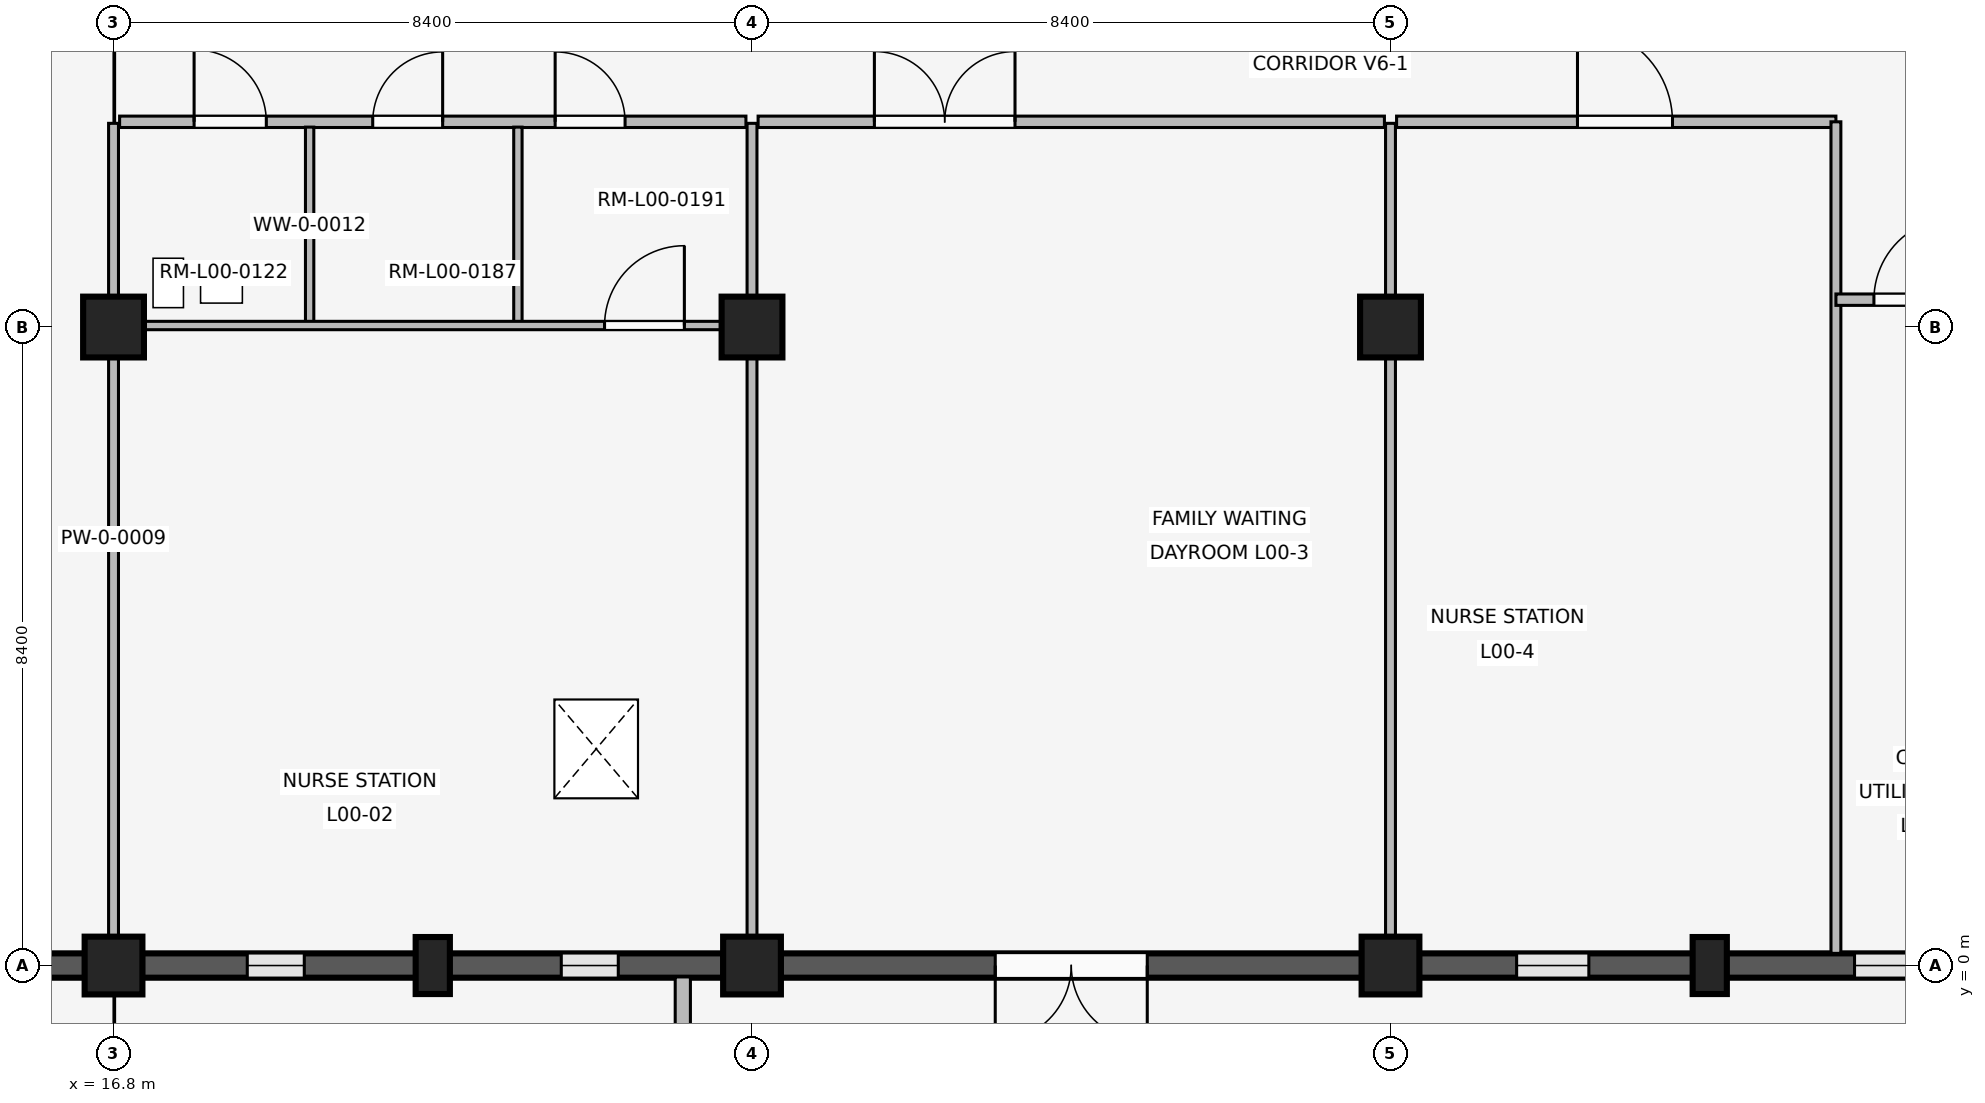
"""IFC4 building model, lengths in metres.
Left out: names, types, materials, properties, quantities, classifications, styles, units other than length and angle.
Written with IfcOpenShell. Run it as: python <this file> out.ifc"""

import sys

from ifc_helpers import new_model, si_unit, direction, frame, frame_2d, origin, origin_2d, place, context, subcontext, project, spatial, rectangle, extrude, element, fill, save


model = new_model("IFC4")
c1 = context("Model", 3, precision=1e-05, world=origin(), true_north=direction((0.0, 1.0)))
c2 = subcontext(c1, "Body", "Model", "MODEL_VIEW")
j1 = project(units=[si_unit("LENGTHUNIT", "METRE"), si_unit("PLANEANGLEUNIT", "RADIAN")], contexts=[c1])
p1 = place(None, origin())
s1 = spatial("IfcSite", under=j1, at=p1, CompositionType="ELEMENT")
p2 = place(p1, origin())
s2 = spatial("IfcBuilding", under=s1, at=p2, CompositionType="ELEMENT")
p3 = place(p2, origin())
s3 = spatial("IfcBuildingStorey", under=s2, at=p3, CompositionType="ELEMENT", Elevation=0.0)
p4 = place(p3, frame((16.8, 0.0, 0.0), z_axis=(0.0, 0.0, 1.0), x_axis=(1.0, 0.0, 0.0)))
e1 = element("IfcColumn", 1, at=p4, inside=s3, PredefinedType="COLUMN", context=c2, shape_type="SweptSolid", body=[
    extrude(rectangle(XDim=0.76, YDim=0.76, at=origin_2d()), origin(), (0.0, 0.0, 1.0), 4.8),
])
p5 = place(p3, frame((16.8, 8.4, 0.0), z_axis=(0.0, 0.0, 1.0), x_axis=(1.0, 0.0, 0.0)))
e2 = element("IfcColumn", 2, at=p5, inside=s3, PredefinedType="COLUMN", context=c2, shape_type="SweptSolid", body=[
    extrude(rectangle(XDim=0.8, YDim=0.8, at=origin_2d()), origin(), (0.0, 0.0, 1.0), 4.8),
])
p6 = place(p3, frame((25.2, 0.0, 0.0), z_axis=(0.0, 0.0, 1.0), x_axis=(1.0, 0.0, 0.0)))
e3 = element("IfcColumn", 3, at=p6, inside=s3, PredefinedType="COLUMN", context=c2, shape_type="SweptSolid", body=[
    extrude(rectangle(XDim=0.76, YDim=0.76, at=origin_2d()), origin(), (0.0, 0.0, 1.0), 4.8),
])
p7 = place(p3, frame((25.2, 8.4, 0.0), z_axis=(0.0, 0.0, 1.0), x_axis=(1.0, 0.0, 0.0)))
e4 = element("IfcColumn", 4, at=p7, inside=s3, PredefinedType="COLUMN", context=c2, shape_type="SweptSolid", body=[
    extrude(rectangle(XDim=0.8, YDim=0.8, at=origin_2d()), origin(), (0.0, 0.0, 1.0), 4.8),
])
p8 = place(p3, frame((33.6, 0.0, 0.0), z_axis=(0.0, 0.0, 1.0), x_axis=(1.0, 0.0, 0.0)))
e5 = element("IfcColumn", 5, at=p8, inside=s3, PredefinedType="COLUMN", context=c2, shape_type="SweptSolid", body=[
    extrude(rectangle(XDim=0.76, YDim=0.76, at=origin_2d()), origin(), (0.0, 0.0, 1.0), 4.8),
])
p9 = place(p3, frame((33.6, 8.4, 0.0), z_axis=(0.0, 0.0, 1.0), x_axis=(1.0, 0.0, 0.0)))
e6 = element("IfcColumn", 6, at=p9, inside=s3, PredefinedType="COLUMN", context=c2, shape_type="SweptSolid", body=[
    extrude(rectangle(XDim=0.8, YDim=0.8, at=origin_2d()), origin(), (0.0, 0.0, 1.0), 4.8),
])
for number, where, z_axis, x_axis in (
    (7, (21.0, 0.0, 0.0), (0.0, 0.0, 1.0), (1.0, 0.0, 0.0)),
    (8, (37.8, 0.0, 0.0), (0.0, 0.0, 1.0), (1.0, 0.0, 0.0)),
):
    element("IfcColumn", number, at=place(p3, frame(where, z_axis=z_axis, x_axis=x_axis)), inside=s3, PredefinedType="PILASTER", context=c2, shape_type="SweptSolid", body=[
        extrude(rectangle(XDim=0.45, YDim=0.75, at=origin_2d()), origin(), (0.0, 0.0, 1.0), 4.8),
    ])
p10 = place(p3, frame((16.425, 0.0, 0.0), z_axis=(0.0, 0.0, 1.0), x_axis=(-1.0, 0.0, 0.0)))
e9 = element("IfcWall", 9, at=p10, inside=s3, PredefinedType="SOLIDWALL", context=c2, shape_type="SweptSolid", body=[
    extrude(rectangle(XDim=7.65, YDim=0.32, at=frame_2d((3.825, 0.0))), origin(), (0.0, 0.0, 1.0), 3.82),
])
p11 = place(p10, frame((2.625, 0.0, 0.0)))
e10 = element("IfcOpeningElement", 10, at=p11, cuts=e9, PredefinedType="OPENING", context=c2, shape_type="SweptSolid", body=[
    extrude(rectangle(XDim=2.4, YDim=2.65, at=frame_2d((1.2, 1.325))), frame((0.0, 0.17, 0.0), z_axis=(0.0, -1.0, 0.0), x_axis=(1.0, 0.0, 0.0)), (0.0, 0.0, 1.0), 0.34),
])
p12 = place(p3, frame((24.825, 0.0, 0.0), z_axis=(0.0, 0.0, 1.0), x_axis=(-1.0, 0.0, 0.0)))
e11 = element("IfcWall", 11, at=p12, inside=s3, PredefinedType="SOLIDWALL", context=c2, shape_type="SweptSolid", body=[
    extrude(rectangle(XDim=7.65, YDim=0.32, at=frame_2d((3.825, 0.0))), origin(), (0.0, 0.0, 1.0), 3.82),
])
p13 = place(p12, frame((1.385, 0.0, 0.85)))
e12 = element("IfcOpeningElement", 12, at=p13, cuts=e11, PredefinedType="OPENING", context=c2, shape_type="SweptSolid", body=[
    extrude(rectangle(XDim=0.75, YDim=1.85, at=frame_2d((0.375, 0.925))), frame((0.0, 0.17, 0.0), z_axis=(0.0, -1.0, 0.0), x_axis=(1.0, 0.0, 0.0)), (0.0, 0.0, 1.0), 0.34),
])
p14 = place(p12, frame((5.515, 0.0, 0.85)))
e13 = element("IfcOpeningElement", 13, at=p14, cuts=e11, PredefinedType="OPENING", context=c2, shape_type="SweptSolid", body=[
    extrude(rectangle(XDim=0.75, YDim=1.85, at=frame_2d((0.375, 0.925))), frame((0.0, 0.17, 0.0), z_axis=(0.0, -1.0, 0.0), x_axis=(1.0, 0.0, 0.0)), (0.0, 0.0, 1.0), 0.34),
])
p15 = place(p3, frame((24.29, -0.15, 0.0), z_axis=(0.0, 0.0, 1.0), x_axis=(0.0, -1.0, 0.0)))
e14 = element("IfcWall", 14, at=p15, inside=s3, PredefinedType="ELEMENTEDWALL", context=c2, shape_type="SweptSolid", body=[
    extrude(rectangle(XDim=0.85, YDim=0.2, at=frame_2d((0.425, 0.0))), origin(), (0.0, 0.0, 1.0), 3.8),
])
p16 = place(p3, frame((33.225, 0.0, 0.0), z_axis=(0.0, 0.0, 1.0), x_axis=(-1.0, 0.0, 0.0)))
e15 = element("IfcWall", 15, at=p16, inside=s3, PredefinedType="SOLIDWALL", context=c2, shape_type="SweptSolid", body=[
    extrude(rectangle(XDim=7.65, YDim=0.32, at=frame_2d((3.825, 0.0))), origin(), (0.0, 0.0, 1.0), 3.82),
])
p17 = place(p16, frame((2.825, 0.0, 0.0)))
e16 = element("IfcOpeningElement", 16, at=p17, cuts=e15, PredefinedType="OPENING", context=c2, shape_type="SweptSolid", body=[
    extrude(rectangle(XDim=2.0, YDim=2.4, at=frame_2d((1.0, 1.2))), frame((0.0, 0.17, 0.0), z_axis=(0.0, -1.0, 0.0), x_axis=(1.0, 0.0, 0.0)), (0.0, 0.0, 1.0), 0.34),
])
p18 = place(p3, frame((41.625, 0.0, 0.0), z_axis=(0.0, 0.0, 1.0), x_axis=(-1.0, 0.0, 0.0)))
e17 = element("IfcWall", 17, at=p18, inside=s3, PredefinedType="SOLIDWALL", context=c2, shape_type="SweptSolid", body=[
    extrude(rectangle(XDim=7.65, YDim=0.32, at=frame_2d((3.825, 0.0))), origin(), (0.0, 0.0, 1.0), 3.82),
])
p19 = place(p18, frame((0.97, 0.0, 0.85)))
e18 = element("IfcOpeningElement", 18, at=p19, cuts=e17, PredefinedType="OPENING", context=c2, shape_type="SweptSolid", body=[
    extrude(rectangle(XDim=0.95, YDim=1.6, at=frame_2d((0.475, 0.8))), frame((0.0, 0.17, 0.0), z_axis=(0.0, -1.0, 0.0), x_axis=(1.0, 0.0, 0.0)), (0.0, 0.0, 1.0), 0.34),
])
p20 = place(p18, frame((5.416, 0.0, 0.85)))
e19 = element("IfcOpeningElement", 19, at=p20, cuts=e17, PredefinedType="OPENING", context=c2, shape_type="SweptSolid", body=[
    extrude(rectangle(XDim=0.95, YDim=1.6, at=frame_2d((0.475, 0.8))), frame((0.0, 0.17, 0.0), z_axis=(0.0, -1.0, 0.0), x_axis=(1.0, 0.0, 0.0)), (0.0, 0.0, 1.0), 0.34),
])
p21 = place(p3, frame((16.8, 0.14, 0.0), z_axis=(0.0, 0.0, 1.0), x_axis=(0.0, 1.0, 0.0)))
e20 = element("IfcWall", 20, at=p21, inside=s3, PredefinedType="PARTITIONING", context=c2, shape_type="SweptSolid", body=[
    extrude(rectangle(XDim=10.94, YDim=0.13, at=frame_2d((5.47, 0.0))), origin(), (0.0, 0.0, 1.0), 3.8),
])
p22 = place(p3, frame((16.88, 11.1, 0.0), z_axis=(0.0, 0.0, 1.0), x_axis=(1.0, 0.0, 0.0)))
e21 = element("IfcWall", 21, at=p22, inside=s3, PredefinedType="PARTITIONING", context=c2, shape_type="SweptSolid", body=[
    extrude(rectangle(XDim=8.24, YDim=0.15, at=frame_2d((4.12, 0.0))), origin(), (0.0, 0.0, 1.0), 3.8),
])
p23 = place(p22, frame((0.98, 0.0, 0.0)))
e22 = element("IfcOpeningElement", 22, at=p23, cuts=e21, PredefinedType="OPENING", context=c2, shape_type="SweptSolid", body=[
    extrude(rectangle(XDim=0.95, YDim=2.15, at=frame_2d((0.475, 1.075))), frame((0.0, 0.085, 0.0), z_axis=(0.0, -1.0, 0.0), x_axis=(1.0, 0.0, 0.0)), (0.0, 0.0, 1.0), 0.17),
])
p24 = place(p22, frame((3.33, 0.0, 0.0)))
e23 = element("IfcOpeningElement", 23, at=p24, cuts=e21, PredefinedType="OPENING", context=c2, shape_type="SweptSolid", body=[
    extrude(rectangle(XDim=0.92, YDim=2.1, at=frame_2d((0.46, 1.05))), frame((0.0, 0.085, 0.0), z_axis=(0.0, -1.0, 0.0), x_axis=(1.0, 0.0, 0.0)), (0.0, 0.0, 1.0), 0.17),
])
p25 = place(p22, frame((5.73, 0.0, 0.0)))
e24 = element("IfcOpeningElement", 24, at=p25, cuts=e21, PredefinedType="OPENING", context=c2, shape_type="SweptSolid", body=[
    extrude(rectangle(XDim=0.92, YDim=2.1, at=frame_2d((0.46, 1.05))), frame((0.0, 0.085, 0.0), z_axis=(0.0, -1.0, 0.0), x_axis=(1.0, 0.0, 0.0)), (0.0, 0.0, 1.0), 0.17),
])
for number, where, z_axis, x_axis in (
    (25, (19.38, 8.44, 0.0), (0.0, 0.0, 1.0), (0.0, 1.0, 0.0)),
    (26, (22.12, 8.44, 0.0), (0.0, 0.0, 1.0), (0.0, 1.0, 0.0)),
):
    element("IfcWall", number, at=place(p3, frame(where, z_axis=z_axis, x_axis=x_axis)), inside=s3, PredefinedType="PARTITIONING", context=c2, shape_type="SweptSolid", body=[
        extrude(rectangle(XDim=2.59, YDim=0.11, at=frame_2d((1.295, 0.0))), origin(), (0.0, 0.0, 1.0), 3.8),
    ])
p26 = place(p3, frame((16.88, 8.42, 0.0), z_axis=(0.0, 0.0, 1.0), x_axis=(1.0, 0.0, 0.0)))
e27 = element("IfcWall", 27, at=p26, inside=s3, PredefinedType="PARTITIONING", context=c2, shape_type="SweptSolid", body=[
    extrude(rectangle(XDim=8.24, YDim=0.11, at=frame_2d((4.12, 0.0))), origin(), (0.0, 0.0, 1.0), 3.8),
])
p27 = place(p26, frame((6.38, 0.0, 0.0)))
e28 = element("IfcOpeningElement", 28, at=p27, cuts=e27, PredefinedType="OPENING", context=c2, shape_type="SweptSolid", body=[
    extrude(rectangle(XDim=1.05, YDim=2.2, at=frame_2d((0.525, 1.1))), frame((0.0, 0.065, 0.0), z_axis=(0.0, -1.0, 0.0), x_axis=(1.0, 0.0, 0.0)), (0.0, 0.0, 1.0), 0.13),
])
p28 = place(p3, frame((25.2, 0.14, 0.0), z_axis=(0.0, 0.0, 1.0), x_axis=(0.0, 1.0, 0.0)))
e29 = element("IfcWall", 29, at=p28, inside=s3, PredefinedType="PARTITIONING", context=c2, shape_type="SweptSolid", body=[
    extrude(rectangle(XDim=10.94, YDim=0.13, at=frame_2d((5.47, 0.0))), origin(), (0.0, 0.0, 1.0), 3.8),
])
p29 = place(p3, frame((25.28, 11.1, 0.0), z_axis=(0.0, 0.0, 1.0), x_axis=(1.0, 0.0, 0.0)))
e30 = element("IfcWall", 30, at=p29, inside=s3, PredefinedType="PARTITIONING", context=c2, shape_type="SweptSolid", body=[
    extrude(rectangle(XDim=8.24, YDim=0.15, at=frame_2d((4.12, 0.0))), origin(), (0.0, 0.0, 1.0), 3.8),
])
p30 = place(p29, frame((1.53, 0.0, 0.0)))
e31 = element("IfcOpeningElement", 31, at=p30, cuts=e30, PredefinedType="OPENING", context=c2, shape_type="SweptSolid", body=[
    extrude(rectangle(XDim=1.85, YDim=2.3, at=frame_2d((0.925, 1.15))), frame((0.0, 0.085, 0.0), z_axis=(0.0, -1.0, 0.0), x_axis=(1.0, 0.0, 0.0)), (0.0, 0.0, 1.0), 0.17),
])
p31 = place(p3, frame((33.6, 0.14, 0.0), z_axis=(0.0, 0.0, 1.0), x_axis=(0.0, 1.0, 0.0)))
e32 = element("IfcWall", 32, at=p31, inside=s3, PredefinedType="PARTITIONING", context=c2, shape_type="SweptSolid", body=[
    extrude(rectangle(XDim=10.94, YDim=0.13, at=frame_2d((5.47, 0.0))), origin(), (0.0, 0.0, 1.0), 3.8),
])
p32 = place(p3, frame((33.68, 11.1, 0.0), z_axis=(0.0, 0.0, 1.0), x_axis=(1.0, 0.0, 0.0)))
e33 = element("IfcWall", 33, at=p32, inside=s3, PredefinedType="PARTITIONING", context=c2, shape_type="SweptSolid", body=[
    extrude(rectangle(XDim=5.78, YDim=0.15, at=frame_2d((2.89, 0.0))), origin(), (0.0, 0.0, 1.0), 3.8),
])
p33 = place(p32, frame((2.38, 0.0, 0.0)))
e34 = element("IfcOpeningElement", 34, at=p33, cuts=e33, PredefinedType="OPENING", context=c2, shape_type="SweptSolid", body=[
    extrude(rectangle(XDim=1.25, YDim=2.2, at=frame_2d((0.625, 1.1))), frame((0.0, 0.085, 0.0), z_axis=(0.0, -1.0, 0.0), x_axis=(1.0, 0.0, 0.0)), (0.0, 0.0, 1.0), 0.17),
])
p34 = place(p3, frame((39.46, 0.16, 0.0), z_axis=(0.0, 0.0, 1.0), x_axis=(0.0, 1.0, 0.0)))
e35 = element("IfcWall", 35, at=p34, inside=s3, PredefinedType="PARTITIONING", context=c2, shape_type="SweptSolid", body=[
    extrude(rectangle(XDim=10.94, YDim=0.13, at=frame_2d((5.47, 0.0))), origin(), (0.0, 0.0, 1.0), 3.8),
])
p35 = place(p3, frame((39.46, 8.76, 0.0), z_axis=(0.0, 0.0, 1.0), x_axis=(1.0, 0.0, 0.0)))
e36 = element("IfcWall", 36, at=p35, inside=s3, PredefinedType="PARTITIONING", context=c2, shape_type="SweptSolid", body=[
    extrude(rectangle(XDim=2.18, YDim=0.15, at=frame_2d((1.09, 0.0))), origin(), (0.0, 0.0, 1.0), 3.8),
])
p36 = place(p35, frame((0.5, 0.0, 0.0)))
e37 = element("IfcOpeningElement", 37, at=p36, cuts=e36, PredefinedType="OPENING", context=c2, shape_type="SweptSolid", body=[
    extrude(rectangle(XDim=1.08, YDim=2.15, at=frame_2d((0.54, 1.075))), frame((0.0, 0.085, 0.0), z_axis=(0.0, -1.0, 0.0), x_axis=(1.0, 0.0, 0.0)), (0.0, 0.0, 1.0), 0.17),
])
p37 = place(p13, origin())
e38 = element("IfcWindow", 38, at=p37, inside=s3, PartitioningType="SINGLE_PANEL", PredefinedType="WINDOW", context=c2, shape_type="SweptSolid", body=[
    extrude(rectangle(XDim=0.75, YDim=1.85, at=frame_2d((0.375, 0.925))), frame((0.0, 0.03, 0.0), z_axis=(0.0, -1.0, 0.0), x_axis=(1.0, 0.0, 0.0)), (0.0, 0.0, 1.0), 0.06),
])
fill(e12, e38)
p38 = place(p14, origin())
e39 = element("IfcWindow", 39, at=p38, inside=s3, PartitioningType="SINGLE_PANEL", PredefinedType="WINDOW", context=c2, shape_type="SweptSolid", body=[
    extrude(rectangle(XDim=0.75, YDim=1.85, at=frame_2d((0.375, 0.925))), frame((0.0, 0.03, 0.0), z_axis=(0.0, -1.0, 0.0), x_axis=(1.0, 0.0, 0.0)), (0.0, 0.0, 1.0), 0.06),
])
fill(e13, e39)
p39 = place(p17, origin())
e40 = element("IfcDoor", 40, at=p39, inside=s3, OperationType="DOUBLE_SWING_LEFT", PredefinedType="DOOR", context=c2, shape_type="SweptSolid", body=[
    extrude(rectangle(XDim=2.0, YDim=2.4, at=frame_2d((1.0, 1.2))), frame((0.0, 0.025, 0.0), z_axis=(0.0, -1.0, 0.0), x_axis=(1.0, 0.0, 0.0)), (0.0, 0.0, 1.0), 0.05),
])
fill(e16, e40)
p40 = place(p19, origin())
e41 = element("IfcWindow", 41, at=p40, inside=s3, PartitioningType="SINGLE_PANEL", PredefinedType="WINDOW", context=c2, shape_type="SweptSolid", body=[
    extrude(rectangle(XDim=0.95, YDim=1.6, at=frame_2d((0.475, 0.8))), frame((0.0, 0.03, 0.0), z_axis=(0.0, -1.0, 0.0), x_axis=(1.0, 0.0, 0.0)), (0.0, 0.0, 1.0), 0.06),
])
fill(e18, e41)
p41 = place(p20, origin())
e42 = element("IfcWindow", 42, at=p41, inside=s3, PartitioningType="SINGLE_PANEL", PredefinedType="WINDOW", context=c2, shape_type="SweptSolid", body=[
    extrude(rectangle(XDim=0.95, YDim=1.6, at=frame_2d((0.475, 0.8))), frame((0.0, 0.03, 0.0), z_axis=(0.0, -1.0, 0.0), x_axis=(1.0, 0.0, 0.0)), (0.0, 0.0, 1.0), 0.06),
])
fill(e19, e42)
p42 = place(p23, origin())
e43 = element("IfcDoor", 43, at=p42, inside=s3, OperationType="SINGLE_SWING_LEFT", PredefinedType="DOOR", context=c2, shape_type="SweptSolid", body=[
    extrude(rectangle(XDim=0.95, YDim=2.15, at=frame_2d((0.475, 1.075))), frame((0.0, 0.025, 0.0), z_axis=(0.0, -1.0, 0.0), x_axis=(1.0, 0.0, 0.0)), (0.0, 0.0, 1.0), 0.05),
])
fill(e22, e43)
p43 = place(p24, origin())
e44 = element("IfcDoor", 44, at=p43, inside=s3, OperationType="SINGLE_SWING_RIGHT", PredefinedType="DOOR", context=c2, shape_type="SweptSolid", body=[
    extrude(rectangle(XDim=0.92, YDim=2.1, at=frame_2d((0.46, 1.05))), frame((0.0, 0.025, 0.0), z_axis=(0.0, -1.0, 0.0), x_axis=(1.0, 0.0, 0.0)), (0.0, 0.0, 1.0), 0.05),
])
fill(e23, e44)
p44 = place(p25, origin())
e45 = element("IfcDoor", 45, at=p44, inside=s3, OperationType="SINGLE_SWING_LEFT", PredefinedType="DOOR", context=c2, shape_type="SweptSolid", body=[
    extrude(rectangle(XDim=0.92, YDim=2.1, at=frame_2d((0.46, 1.05))), frame((0.0, 0.025, 0.0), z_axis=(0.0, -1.0, 0.0), x_axis=(1.0, 0.0, 0.0)), (0.0, 0.0, 1.0), 0.05),
])
fill(e24, e45)
p45 = place(p27, origin())
e46 = element("IfcDoor", 46, at=p45, inside=s3, OperationType="SINGLE_SWING_RIGHT", PredefinedType="DOOR", context=c2, shape_type="SweptSolid", body=[
    extrude(rectangle(XDim=1.05, YDim=2.2, at=frame_2d((0.525, 1.1))), frame((0.0, 0.025, 0.0), z_axis=(0.0, -1.0, 0.0), x_axis=(1.0, 0.0, 0.0)), (0.0, 0.0, 1.0), 0.05),
])
fill(e28, e46)
p46 = place(p30, origin())
e47 = element("IfcDoor", 47, at=p46, inside=s3, OperationType="DOUBLE_SWING_LEFT", PredefinedType="DOOR", context=c2, shape_type="SweptSolid", body=[
    extrude(rectangle(XDim=1.85, YDim=2.3, at=frame_2d((0.925, 1.15))), frame((0.0, 0.025, 0.0), z_axis=(0.0, -1.0, 0.0), x_axis=(1.0, 0.0, 0.0)), (0.0, 0.0, 1.0), 0.05),
])
fill(e31, e47)
p47 = place(p33, origin())
e48 = element("IfcDoor", 48, at=p47, inside=s3, OperationType="SINGLE_SWING_LEFT", PredefinedType="DOOR", context=c2, shape_type="SweptSolid", body=[
    extrude(rectangle(XDim=1.25, YDim=2.2, at=frame_2d((0.625, 1.1))), frame((0.0, 0.025, 0.0), z_axis=(0.0, -1.0, 0.0), x_axis=(1.0, 0.0, 0.0)), (0.0, 0.0, 1.0), 0.05),
])
fill(e34, e48)
p48 = place(p36, origin())
e49 = element("IfcDoor", 49, at=p48, inside=s3, OperationType="SINGLE_SWING_RIGHT", PredefinedType="DOOR", context=c2, shape_type="SweptSolid", body=[
    extrude(rectangle(XDim=1.08, YDim=2.15, at=frame_2d((0.54, 1.075))), frame((0.0, 0.025, 0.0), z_axis=(0.0, -1.0, 0.0), x_axis=(1.0, 0.0, 0.0)), (0.0, 0.0, 1.0), 0.05),
])
fill(e37, e49)
save(model, sys.argv[1])
